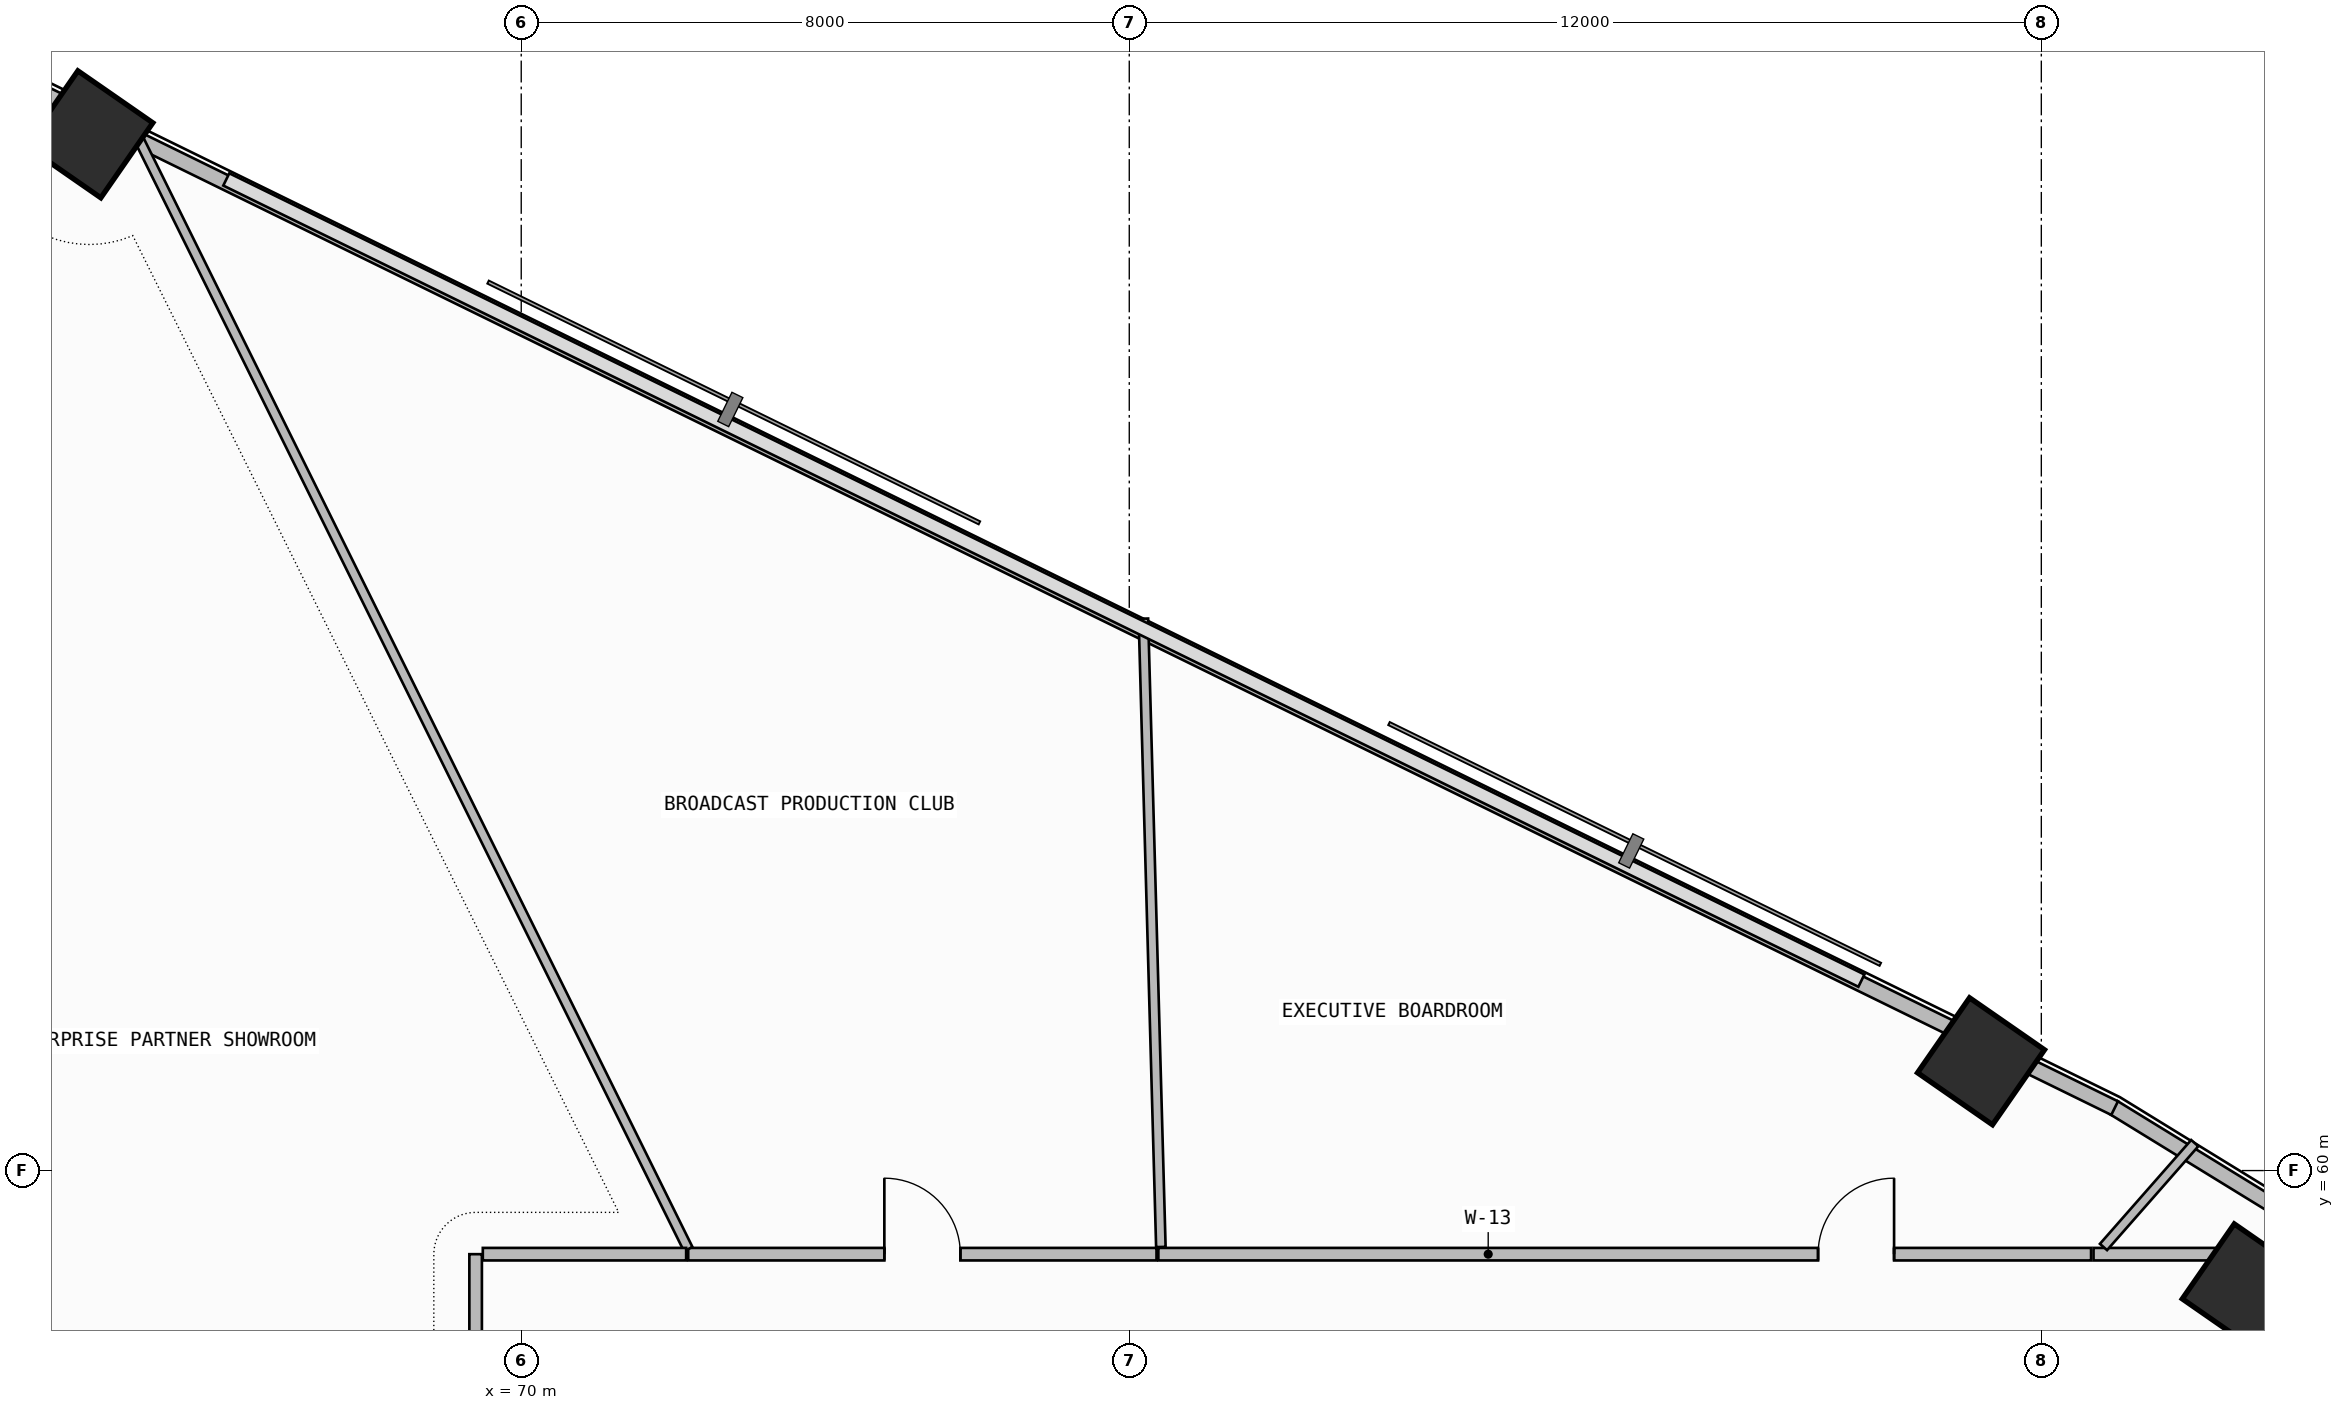
"""IFC4 building model, lengths in metres.
Left out: names, types, materials, properties, quantities, classifications, styles, units other than length and angle.
Written with IfcOpenShell. Run it as: python <this file> out.ifc"""

import sys

from ifc_helpers import new_model, si_unit, direction, frame, frame_2d, origin, origin_2d, place, context, subcontext, project, spatial, rectangle, extrude, element, fill, save


model = new_model("IFC4")
c1 = context("Model", 3, precision=1e-05, world=origin(), true_north=direction((0.0, 1.0)))
c2 = subcontext(c1, "Body", "Model", "MODEL_VIEW")
j1 = project(units=[si_unit("LENGTHUNIT", "METRE"), si_unit("PLANEANGLEUNIT", "RADIAN")], contexts=[c1])
p1 = place(None, origin())
s1 = spatial("IfcSite", under=j1, at=p1, CompositionType="ELEMENT")
p2 = place(p1, origin())
s2 = spatial("IfcBuilding", under=s1, at=p2, CompositionType="ELEMENT")
p3 = place(p2, frame((0.0, 0.0, 120.9)))
s3 = spatial("IfcBuildingStorey", under=s2, at=p3, CompositionType="ELEMENT", Elevation=120.9)
for number, where, z_axis, x_axis in (
    (1, (92.69, 58.463, 0.0), (0.0, 0.0, 1.0), (0.57, 0.822, 0.0)),
    (2, (89.207, 61.438, 0.0), (0.0, 0.0, 1.0), (0.57, 0.822, 0.0)),
    (3, (64.318, 73.633, 0.0), (0.0, 0.0, 1.0), (0.57, 0.822, 0.0)),
):
    element("IfcColumn", number, at=place(p3, frame(where, z_axis=z_axis, x_axis=x_axis)), inside=s3, PredefinedType="COLUMN", context=c2, shape_type="SweptSolid", body=[
        extrude(rectangle(XDim=1.2, YDim=1.2, at=origin_2d()), origin(), (0.0, 0.0, 1.0), 3.6),
    ])
p4 = place(p3, frame((119.865, 43.07, 0.0), z_axis=(0.0, 0.0, 1.0), x_axis=(-0.852110824326, 0.52336138859, 0.0)))
e4 = element("IfcWall", 4, at=p4, inside=s3, PredefinedType="PARAPET", context=c2, shape_type="SweptSolid", body=[
    extrude(rectangle(XDim=33.932, YDim=0.2, at=frame_2d((16.966, 0.0))), origin(), (0.0, 0.0, 1.0), 1.15),
])
p5 = place(p3, frame((90.964, 60.822, 0.0), z_axis=(0.0, 0.0, 1.0), x_axis=(-0.898000468284, 0.439994498787, 0.0)))
e5 = element("IfcWall", 5, at=p5, inside=s3, PredefinedType="PARAPET", context=c2, shape_type="SweptSolid", body=[
    extrude(rectangle(XDim=1.423, YDim=0.2, at=frame_2d((0.712, 0.0))), origin(), (0.0, 0.0, 1.0), 1.15),
])
p6 = place(p3, frame((88.921, 61.823, 0.0), z_axis=(0.0, 0.0, 1.0), x_axis=(-0.897993533426, 0.440008652103, 0.0)))
e6 = element("IfcWall", 6, at=p6, inside=s3, PredefinedType="PARAPET", context=c2, shape_type="SweptSolid", body=[
    extrude(rectangle(XDim=26.864, YDim=0.2, at=frame_2d((13.432, 0.0))), origin(), (0.0, 0.0, 1.0), 1.15),
])
p7 = place(p3, frame((64.032, 74.018, 0.0), z_axis=(0.0, 0.0, 1.0), x_axis=(-0.89799103332, 0.440013754417, 0.0)))
e7 = element("IfcWall", 7, at=p7, inside=s3, PredefinedType="PARAPET", context=c2, shape_type="SweptSolid", body=[
    extrude(rectangle(XDim=3.955, YDim=0.2, at=frame_2d((1.978, 0.0))), origin(), (0.0, 0.0, 1.0), 1.15),
])
p8 = place(p3, frame((93.442, 58.9, 0.0), z_axis=(0.0, 0.0, 1.0), x_axis=(-1.0, 0.0, 0.0)))
e8 = element("IfcWall", 8, at=p8, inside=s3, PredefinedType="PARTITIONING", context=c2, shape_type="SweptSolid", body=[
    extrude(rectangle(XDim=2.755, YDim=0.165, at=frame_2d((1.377, 0.0))), origin(), (0.0, 0.0, 1.0), 2.725),
])
p9 = place(p3, frame((90.818, 58.994, 0.0), z_axis=(0.0, 0.0, 1.0), x_axis=(0.6599952554, 0.751269767027, 0.0)))
e9 = element("IfcWall", 9, at=p9, inside=s3, PredefinedType="PARTITIONING", context=c2, shape_type="SweptSolid", body=[
    extrude(rectangle(XDim=1.819, YDim=0.125, at=frame_2d((0.909, 0.0))), origin(), (0.0, 0.0, 1.0), 2.725),
])
p10 = place(p3, frame((90.655, 58.9, 0.0), z_axis=(0.0, 0.0, 1.0), x_axis=(-1.0, 0.0, 0.0)))
e10 = element("IfcWall", 10, at=p10, inside=s3, PredefinedType="PARTITIONING", context=c2, shape_type="SweptSolid", body=[
    extrude(rectangle(XDim=12.272, YDim=0.165, at=frame_2d((6.136, 0.0))), origin(), (0.0, 0.0, 1.0), 2.725),
])
p11 = place(p10, frame((2.592, 0.0, 0.0)))
e11 = element("IfcOpeningElement", 11, at=p11, cuts=e10, PredefinedType="OPENING", context=c2, shape_type="SweptSolid", body=[
    extrude(rectangle(XDim=1.0, YDim=2.2, at=frame_2d((0.5, 1.1))), frame((0.0, 0.093, 0.0), z_axis=(0.0, -1.0, 0.0), x_axis=(1.0, 0.0, 0.0)), (0.0, 0.0, 1.0), 0.185),
])
p12 = place(p3, frame((78.416, 58.994, 0.0), z_axis=(0.0, 0.0, 1.0), x_axis=(-0.027809677154, 0.999613236135, 0.0)))
e12 = element("IfcWall", 12, at=p12, inside=s3, PredefinedType="PARTITIONING", context=c2, shape_type="SweptSolid", body=[
    extrude(rectangle(XDim=8.27, YDim=0.125, at=frame_2d((4.135, 0.0))), origin(), (0.0, 0.0, 1.0), 3.34),
])
p13 = place(p3, frame((78.358, 58.9, 0.0), z_axis=(0.0, 0.0, 1.0), x_axis=(-1.0, 0.0, 0.0)))
e13 = element("IfcWall", 13, at=p13, inside=s3, PredefinedType="PARTITIONING", context=c2, shape_type="SweptSolid", body=[
    extrude(rectangle(XDim=6.162, YDim=0.165, at=frame_2d((3.081, 0.0))), origin(), (0.0, 0.0, 1.0), 3.34),
])
p14 = place(p13, frame((2.581, 0.0, 0.0)))
e14 = element("IfcOpeningElement", 14, at=p14, cuts=e13, PredefinedType="OPENING", context=c2, shape_type="SweptSolid", body=[
    extrude(rectangle(XDim=1.0, YDim=2.2, at=frame_2d((0.5, 1.1))), frame((0.0, 0.093, 0.0), z_axis=(0.0, -1.0, 0.0), x_axis=(1.0, 0.0, 0.0)), (0.0, 0.0, 1.0), 0.185),
])
p15 = place(p3, frame((72.197, 58.967, 0.0), z_axis=(0.0, 0.0, 1.0), x_axis=(-0.443596581614, 0.896226574467, 0.0)))
e15 = element("IfcWall", 15, at=p15, inside=s3, PredefinedType="PARTITIONING", context=c2, shape_type="SweptSolid", body=[
    extrude(rectangle(XDim=16.54, YDim=0.125, at=frame_2d((8.27, 0.0))), origin(), (0.0, 0.0, 1.0), 3.34),
])
p16 = place(p3, frame((69.4, 58.9, 0.0), z_axis=(0.0, 0.0, 1.0), x_axis=(0.0, -1.0, 0.0)))
e16 = element("IfcWall", 16, at=p16, inside=s3, PredefinedType="PARTITIONING", context=c2, shape_type="SweptSolid", body=[
    extrude(rectangle(XDim=9.875, YDim=0.165, at=frame_2d((4.938, 0.0))), origin(), (0.0, 0.0, 1.0), 2.725),
])
p17 = place(p16, frame((8.336, 0.0, 0.0)))
e17 = element("IfcOpeningElement", 17, at=p17, cuts=e16, PredefinedType="OPENING", context=c2, shape_type="SweptSolid", body=[
    extrude(rectangle(XDim=1.0, YDim=2.2, at=frame_2d((0.5, 1.1))), frame((0.0, 0.093, 0.0), z_axis=(0.0, -1.0, 0.0), x_axis=(1.0, 0.0, 0.0)), (0.0, 0.0, 1.0), 0.185),
])
p18 = place(p3, frame((72.17, 58.9, 0.0), z_axis=(0.0, 0.0, 1.0), x_axis=(-1.0, 0.0, 0.0)))
e18 = element("IfcWall", 18, at=p18, inside=s3, PredefinedType="PARTITIONING", context=c2, shape_type="SweptSolid", body=[
    extrude(rectangle(XDim=2.676, YDim=0.165, at=frame_2d((1.338, 0.0))), origin(), (0.0, 0.0, 1.0), 2.725),
])
p19 = place(p11, frame((1.0, 0.0, 0.0), z_axis=(0.0, 0.0, 1.0), x_axis=(-1.0, 0.0, 0.0)))
e19 = element("IfcDoor", 19, at=p19, inside=s3, OperationType="SINGLE_SWING_RIGHT", PredefinedType="DOOR", context=c2, shape_type="SweptSolid", body=[
    extrude(rectangle(XDim=1.0, YDim=2.2, at=frame_2d((0.5, 1.1))), frame((0.0, 0.025, 0.0), z_axis=(0.0, -1.0, 0.0), x_axis=(1.0, 0.0, 0.0)), (0.0, 0.0, 1.0), 0.05),
])
fill(e11, e19)
p20 = place(p14, frame((1.0, 0.0, 0.0), z_axis=(0.0, 0.0, 1.0), x_axis=(-1.0, 0.0, 0.0)))
e20 = element("IfcDoor", 20, at=p20, inside=s3, OperationType="SINGLE_SWING_LEFT", PredefinedType="DOOR", context=c2, shape_type="SweptSolid", body=[
    extrude(rectangle(XDim=1.0, YDim=2.2, at=frame_2d((0.5, 1.1))), frame((0.0, 0.025, 0.0), z_axis=(0.0, -1.0, 0.0), x_axis=(1.0, 0.0, 0.0)), (0.0, 0.0, 1.0), 0.05),
])
fill(e14, e20)
save(model, sys.argv[1])
